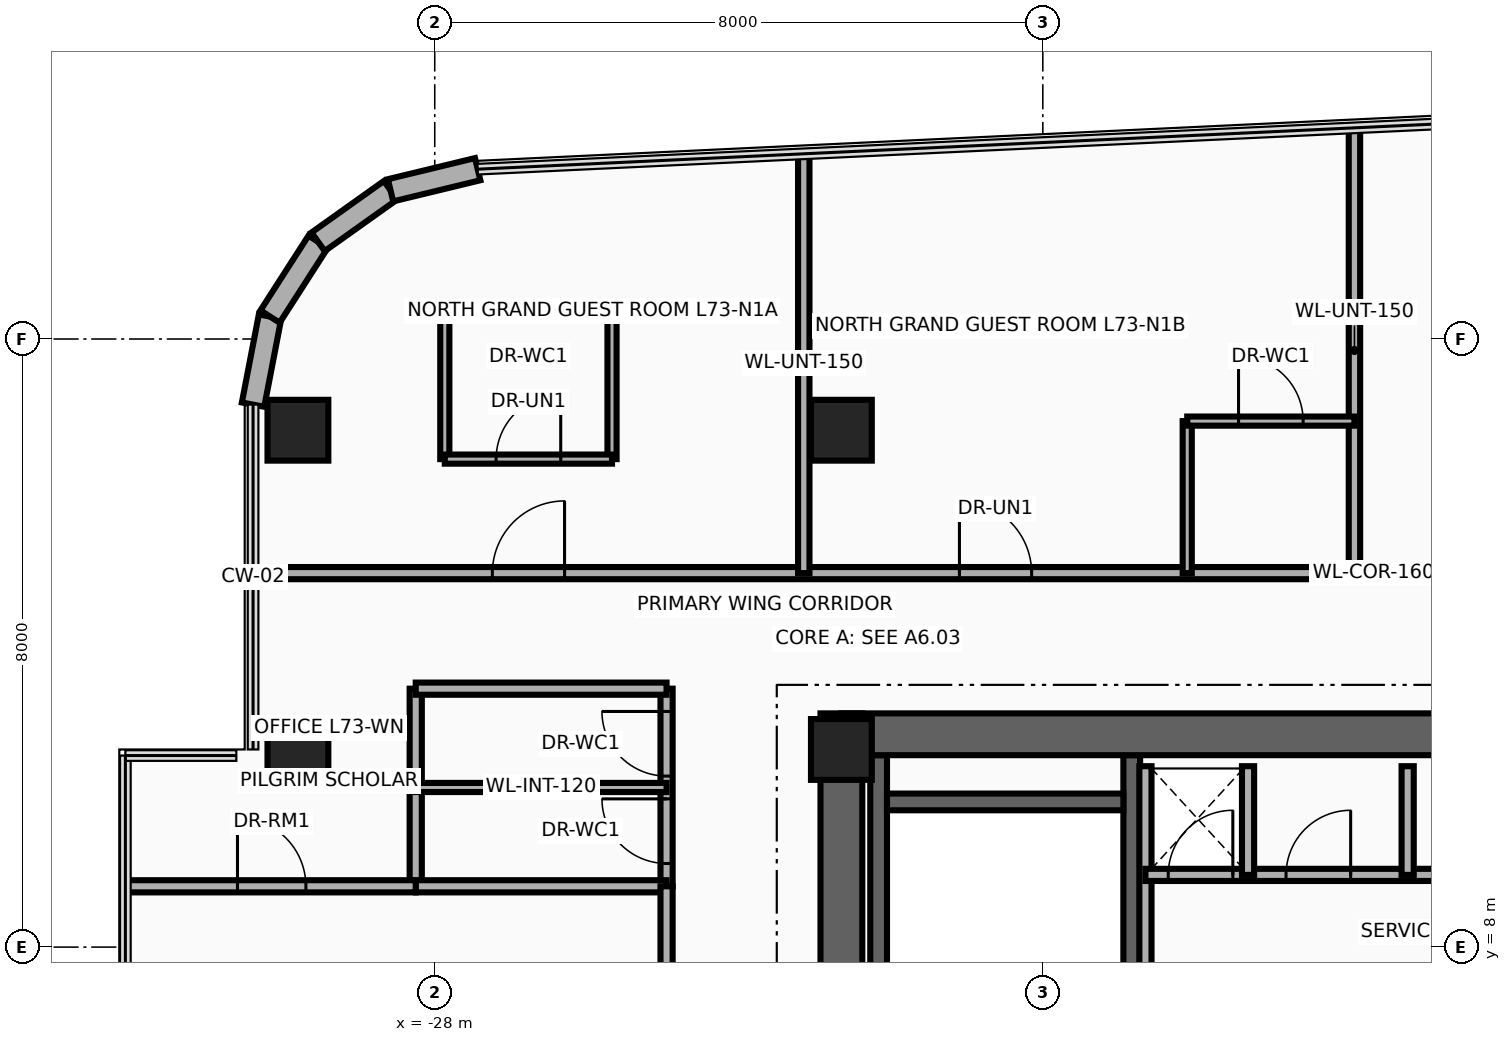
"""IFC4 building model, lengths in metres.
Left out: names, types, materials, properties, quantities, classifications, styles, units other than length and angle.
Written with IfcOpenShell. Run it as: python <this file> out.ifc"""

import sys

from ifc_helpers import new_model, si_unit, direction, frame, frame_2d, origin, origin_2d, place, context, subcontext, project, spatial, rectangle, extrude, source, transform, mapped, element, fill, save


model = new_model("IFC4")
c1 = context("Model", 3, precision=1e-05, world=origin(), true_north=direction((0.0, 1.0)))
c2 = subcontext(c1, "Body", "Model", "MODEL_VIEW")
j1 = project(units=[si_unit("LENGTHUNIT", "METRE"), si_unit("PLANEANGLEUNIT", "RADIAN")], contexts=[c1])
p1 = place(None, origin())
s1 = spatial("IfcSite", under=j1, at=p1, CompositionType="ELEMENT")
p2 = place(p1, origin())
s2 = spatial("IfcBuilding", under=s1, at=p2, CompositionType="ELEMENT")
p3 = place(p2, frame((0.0, 0.0, 280.0)))
s3 = spatial("IfcBuildingStorey", under=s2, at=p3, CompositionType="ELEMENT", Elevation=280.0)
for number, where, z_axis, x_axis in (
    (1, (-22.16, 1.78, 0.0), (0.0, 0.0, 1.0), (0.0, 1.0, 0.0)),
    (2, (-18.83, 1.78, 0.0), (0.0, 0.0, 1.0), (0.0, 1.0, 0.0)),
):
    element("IfcWall", number, at=place(p3, frame(where, z_axis=z_axis, x_axis=x_axis)), inside=s3, PredefinedType="SHEAR", context=c2, shape_type="SweptSolid", body=[
        extrude(rectangle(XDim=8.745, YDim=0.22, at=frame_2d((4.373, 0.0))), origin(), (0.0, 0.0, 1.0), 3.26),
    ])
p4 = place(p3, frame((-22.05, 9.91, 0.0), z_axis=(0.0, 0.0, 1.0), x_axis=(1.0, 0.0, 0.0)))
e3 = element("IfcWall", 3, at=p4, inside=s3, PredefinedType="SHEAR", context=c2, shape_type="SweptSolid", body=[
    extrude(rectangle(XDim=3.11, YDim=0.22, at=frame_2d((1.555, 0.0))), origin(), (0.0, 0.0, 1.0), 3.26),
])
p5 = place(p3, frame((-22.65, -11.075, 0.0), z_axis=(0.0, 0.0, 1.0), x_axis=(0.0, 1.0, 0.0)))
e4 = element("IfcWall", 4, at=p5, inside=s3, PredefinedType="SHEAR", context=c2, shape_type="SweptSolid", body=[
    extrude(rectangle(XDim=22.15, YDim=0.55, at=frame_2d((11.075, 0.0))), origin(), (0.0, 0.0, 1.0), 3.26),
])
p6 = place(p3, frame((-22.65, 10.8, 0.0), z_axis=(0.0, 0.0, 1.0), x_axis=(1.0, 0.0, 0.0)))
e5 = element("IfcWall", 5, at=p6, inside=s3, PredefinedType="SHEAR", context=c2, shape_type="SweptSolid", body=[
    extrude(rectangle(XDim=10.25, YDim=0.55, at=frame_2d((5.125, 0.0))), origin(), (0.0, 0.0, 1.0), 3.26),
])
m1 = source(origin(), c2, "Body", "SweptSolid", [
    extrude(rectangle(XDim=0.8, YDim=0.8, at=origin_2d()), origin(), (0.0, 0.0, 1.0), 3.5),
])
for number, where, z_axis, x_axis in (
    (6, (-29.8, 10.6, 0.0), (0.0, 0.0, 1.0), (1.0, 0.0, 0.0)),
    (7, (-22.65, 10.6, 0.0), (0.0, 0.0, 1.0), (1.0, 0.0, 0.0)),
    (8, (-29.8, 14.8, 0.0), (0.0, 0.0, 1.0), (1.0, 0.0, 0.0)),
    (9, (-22.65, 14.8, 0.0), (0.0, 0.0, 1.0), (1.0, 0.0, 0.0)),
):
    element("IfcColumn", number, at=place(p3, frame(where, z_axis=z_axis, x_axis=x_axis)), inside=s3, PredefinedType="COLUMN", context=c2, shape_type="MappedRepresentation", body=[
        mapped(m1, transform((0.0, 0.0, 0.0), x_axis=(1.0, 0.0, 0.0), y_axis=(0.0, 1.0, 0.0), z_axis=(0.0, 0.0, 1.0), scale=1.0)),
    ])
p7 = place(p3, frame((-30.39, 15.137, 0.0), z_axis=(0.0, 0.0, 1.0), x_axis=(0.189307792679, 0.981917796779, 0.0)))
e10 = element("IfcWall", 10, at=p7, inside=s3, PredefinedType="SOLIDWALL", context=c2, shape_type="SweptSolid", body=[
    extrude(rectangle(XDim=1.18, YDim=0.3, at=frame_2d((0.59, 0.0))), origin(), (0.0, 0.0, 1.0), 2.245),
])
p8 = place(p3, frame((-30.167, 16.295, 0.0), z_axis=(0.0, 0.0, 1.0), x_axis=(0.540842020947, 0.841124193195, 0.0)))
e11 = element("IfcWall", 11, at=p8, inside=s3, PredefinedType="SOLIDWALL", context=c2, shape_type="SweptSolid", body=[
    extrude(rectangle(XDim=1.169, YDim=0.3, at=frame_2d((0.584, 0.0))), origin(), (0.0, 0.0, 1.0), 3.26),
])
p9 = place(p3, frame((-29.534, 17.279, 0.0), z_axis=(0.0, 0.0, 1.0), x_axis=(0.81466371606, 0.579933642527, 0.0)))
e12 = element("IfcWall", 12, at=p9, inside=s3, PredefinedType="SOLIDWALL", context=c2, shape_type="SweptSolid", body=[
    extrude(rectangle(XDim=1.169, YDim=0.3, at=frame_2d((0.584, 0.0))), origin(), (0.0, 0.0, 1.0), 3.26),
])
p10 = place(p3, frame((-28.582, 17.957, 0.0), z_axis=(0.0, 0.0, 1.0), x_axis=(0.971929016595, 0.235274279725, 0.0)))
e13 = element("IfcWall", 13, at=p10, inside=s3, PredefinedType="SOLIDWALL", context=c2, shape_type="SweptSolid", body=[
    extrude(rectangle(XDim=1.18, YDim=0.3, at=frame_2d((0.59, 0.0))), origin(), (0.0, 0.0, 1.0), 3.26),
])
p11 = place(p3, frame((-18.65, 7.45, 0.0), z_axis=(0.0, 0.0, 1.0), x_axis=(0.0, 1.0, 0.0)))
e14 = element("IfcWall", 14, at=p11, inside=s3, PredefinedType="PARTITIONING", context=c2, shape_type="SweptSolid", body=[
    extrude(rectangle(XDim=2.93, YDim=0.16, at=frame_2d((1.465, 0.0))), origin(), (0.0, 0.0, 1.0), 3.26),
])
p12 = place(p3, frame((-18.65, 8.95, 0.0), z_axis=(0.0, 0.0, 1.0), x_axis=(1.0, 0.0, 0.0)))
e15 = element("IfcWall", 15, at=p12, inside=s3, PredefinedType="PARTITIONING", context=c2, shape_type="SweptSolid", body=[
    extrude(rectangle(XDim=5.5, YDim=0.16, at=frame_2d((2.75, 0.0))), origin(), (0.0, 0.0, 1.0), 3.26),
])
p13 = place(p12, frame((0.3, 0.0, 0.0)))
e16 = element("IfcOpeningElement", 16, at=p13, cuts=e15, PredefinedType="OPENING", context=c2, shape_type="SweptSolid", body=[
    extrude(rectangle(XDim=0.85, YDim=2.05, at=frame_2d((0.425, 1.025))), frame((0.0, 0.095, 0.0), z_axis=(0.0, -1.0, 0.0), x_axis=(1.0, 0.0, 0.0)), (0.0, 0.0, 1.0), 0.19),
])
p14 = place(p12, frame((1.85, 0.0, 0.0)))
e17 = element("IfcOpeningElement", 17, at=p14, cuts=e15, PredefinedType="OPENING", context=c2, shape_type="SweptSolid", body=[
    extrude(rectangle(XDim=0.85, YDim=2.05, at=frame_2d((0.425, 1.025))), frame((0.0, 0.095, 0.0), z_axis=(0.0, -1.0, 0.0), x_axis=(1.0, 0.0, 0.0)), (0.0, 0.0, 1.0), 0.19),
])
p15 = place(p12, frame((3.9, 0.0, 0.0)))
e18 = element("IfcOpeningElement", 18, at=p15, cuts=e15, PredefinedType="OPENING", context=c2, shape_type="SweptSolid", body=[
    extrude(rectangle(XDim=0.85, YDim=2.05, at=frame_2d((0.425, 1.025))), frame((0.0, 0.095, 0.0), z_axis=(0.0, -1.0, 0.0), x_axis=(1.0, 0.0, 0.0)), (0.0, 0.0, 1.0), 0.19),
])
for number, where, z_axis, x_axis in (
    (19, (-17.3, 8.95, 0.0), (0.0, 0.0, 1.0), (0.0, 1.0, 0.0)),
    (20, (-15.2, 8.95, 0.0), (0.0, 0.0, 1.0), (0.0, 1.0, 0.0)),
):
    element("IfcWall", number, at=place(p3, frame(where, z_axis=z_axis, x_axis=x_axis)), inside=s3, PredefinedType="PARTITIONING", context=c2, shape_type="SweptSolid", body=[
        extrude(rectangle(XDim=1.43, YDim=0.16, at=frame_2d((0.715, 0.0))), origin(), (0.0, 0.0, 1.0), 3.26),
    ])
p16 = place(p3, frame((-28.25, 8.8, 0.0), z_axis=(0.0, 0.0, 1.0), x_axis=(0.0, 1.0, 0.0)))
e21 = element("IfcWall", 21, at=p16, inside=s3, PredefinedType="PARTITIONING", context=c2, shape_type="SweptSolid", body=[
    extrude(rectangle(XDim=2.6, YDim=0.16, at=frame_2d((1.3, 0.0))), origin(), (0.0, 0.0, 1.0), 2.623),
])
p17 = place(p3, frame((-24.95, 8.8, 0.0), z_axis=(0.0, 0.0, 1.0), x_axis=(0.0, 1.0, 0.0)))
e22 = element("IfcWall", 22, at=p17, inside=s3, PredefinedType="PARTITIONING", context=c2, shape_type="SweptSolid", body=[
    extrude(rectangle(XDim=2.6, YDim=0.16, at=frame_2d((1.3, 0.0))), origin(), (0.0, 0.0, 1.0), 2.623),
])
p18 = place(p17, frame((0.3, 0.0, 0.0)))
e23 = element("IfcOpeningElement", 23, at=p18, cuts=e22, PredefinedType="OPENING", context=c2, shape_type="SweptSolid", body=[
    extrude(rectangle(XDim=0.85, YDim=2.1, at=frame_2d((0.425, 1.05))), frame((0.0, 0.095, 0.0), z_axis=(0.0, -1.0, 0.0), x_axis=(1.0, 0.0, 0.0)), (0.0, 0.0, 1.0), 0.19),
])
p19 = place(p17, frame((1.45, 0.0, 0.0)))
e24 = element("IfcOpeningElement", 24, at=p19, cuts=e22, PredefinedType="OPENING", context=c2, shape_type="SweptSolid", body=[
    extrude(rectangle(XDim=0.85, YDim=2.1, at=frame_2d((0.425, 1.05))), frame((0.0, 0.095, 0.0), z_axis=(0.0, -1.0, 0.0), x_axis=(1.0, 0.0, 0.0)), (0.0, 0.0, 1.0), 0.19),
])
for number, where, z_axis, x_axis in (
    (25, (-28.25, 8.8, 0.0), (0.0, 0.0, 1.0), (1.0, 0.0, 0.0)),
    (26, (-28.25, 11.4, 0.0), (0.0, 0.0, 1.0), (1.0, 0.0, 0.0)),
):
    element("IfcWall", number, at=place(p3, frame(where, z_axis=z_axis, x_axis=x_axis)), inside=s3, PredefinedType="PARTITIONING", context=c2, shape_type="SweptSolid", body=[
        extrude(rectangle(XDim=3.3, YDim=0.16, at=frame_2d((1.65, 0.0))), origin(), (0.0, 0.0, 1.0), 3.26),
    ])
p20 = place(p3, frame((-28.25, 10.1, 0.0), z_axis=(0.0, 0.0, 1.0), x_axis=(1.0, 0.0, 0.0)))
e27 = element("IfcWall", 27, at=p20, inside=s3, PredefinedType="PARTITIONING", context=c2, shape_type="SweptSolid", body=[
    extrude(rectangle(XDim=3.3, YDim=0.12, at=frame_2d((1.65, 0.0))), origin(), (0.0, 0.0, 1.0), 3.26),
])
p21 = place(p3, frame((-24.95, -16.24, 0.0), z_axis=(0.0, 0.0, 1.0), x_axis=(0.0, 1.0, 0.0)))
e28 = element("IfcWall", 28, at=p21, inside=s3, PredefinedType="PARTITIONING", context=c2, shape_type="SweptSolid", body=[
    extrude(rectangle(XDim=25.04, YDim=0.16, at=frame_2d((12.52, 0.0))), origin(), (0.0, 0.0, 1.0), 2.623),
])
p22 = place(p21, frame((2.442, 0.0, 0.0)))
e29 = element("IfcOpeningElement", 29, at=p22, cuts=e28, PredefinedType="OPENING", context=c2, shape_type="SweptSolid", body=[
    extrude(rectangle(XDim=0.9, YDim=2.1, at=frame_2d((0.45, 1.05))), frame((0.0, 0.095, 0.0), z_axis=(0.0, -1.0, 0.0), x_axis=(1.0, 0.0, 0.0)), (0.0, 0.0, 1.0), 0.19),
])
p23 = place(p21, frame((8.227, 0.0, 0.0)))
e30 = element("IfcOpeningElement", 30, at=p23, cuts=e28, PredefinedType="OPENING", context=c2, shape_type="SweptSolid", body=[
    extrude(rectangle(XDim=0.9, YDim=2.1, at=frame_2d((0.45, 1.05))), frame((0.0, 0.095, 0.0), z_axis=(0.0, -1.0, 0.0), x_axis=(1.0, 0.0, 0.0)), (0.0, 0.0, 1.0), 0.19),
])
p24 = place(p21, frame((13.463, 0.0, 0.0)))
e31 = element("IfcOpeningElement", 31, at=p24, cuts=e28, PredefinedType="OPENING", context=c2, shape_type="SweptSolid", body=[
    extrude(rectangle(XDim=0.95, YDim=2.15, at=frame_2d((0.475, 1.075))), frame((0.0, 0.095, 0.0), z_axis=(0.0, -1.0, 0.0), x_axis=(1.0, 0.0, 0.0)), (0.0, 0.0, 1.0), 0.19),
])
p25 = place(p21, frame((22.197, 0.0, 0.0)))
e32 = element("IfcOpeningElement", 32, at=p25, cuts=e28, PredefinedType="OPENING", context=c2, shape_type="SweptSolid", body=[
    extrude(rectangle(XDim=0.95, YDim=2.15, at=frame_2d((0.475, 1.075))), frame((0.0, 0.095, 0.0), z_axis=(0.0, -1.0, 0.0), x_axis=(1.0, 0.0, 0.0)), (0.0, 0.0, 1.0), 0.19),
])
p26 = place(p3, frame((-32.04, 8.8, 0.0), z_axis=(0.0, 0.0, 1.0), x_axis=(1.0, 0.0, 0.0)))
e33 = element("IfcWall", 33, at=p26, inside=s3, PredefinedType="PARTITIONING", context=c2, shape_type="SweptSolid", body=[
    extrude(rectangle(XDim=3.79, YDim=0.16, at=frame_2d((1.895, 0.0))), origin(), (0.0, 0.0, 1.0), 2.706),
])
p27 = place(p26, frame((1.445, 0.0, 0.0)))
e34 = element("IfcOpeningElement", 34, at=p27, cuts=e33, PredefinedType="OPENING", context=c2, shape_type="SweptSolid", body=[
    extrude(rectangle(XDim=0.9, YDim=2.1, at=frame_2d((0.45, 1.05))), frame((0.0, 0.095, 0.0), z_axis=(0.0, -1.0, 0.0), x_axis=(1.0, 0.0, 0.0)), (0.0, 0.0, 1.0), 0.19),
])
p28 = place(p3, frame((-30.39, 12.92, 0.0), z_axis=(0.0, 0.0, 1.0), x_axis=(1.0, 0.0, 0.0)))
e35 = element("IfcWall", 35, at=p28, inside=s3, PredefinedType="PARTITIONING", context=c2, shape_type="SweptSolid", body=[
    extrude(rectangle(XDim=29.48, YDim=0.16, at=frame_2d((14.74, 0.0))), origin(), (0.0, 0.0, 1.0), 2.634),
])
p29 = place(p28, frame((3.148, 0.0, 0.0)))
e36 = element("IfcOpeningElement", 36, at=p29, cuts=e35, PredefinedType="OPENING", context=c2, shape_type="SweptSolid", body=[
    extrude(rectangle(XDim=0.95, YDim=2.15, at=frame_2d((0.475, 1.075))), frame((0.0, 0.095, 0.0), z_axis=(0.0, -1.0, 0.0), x_axis=(1.0, 0.0, 0.0)), (0.0, 0.0, 1.0), 0.19),
])
p30 = place(p28, frame((9.293, 0.0, 0.0)))
e37 = element("IfcOpeningElement", 37, at=p30, cuts=e35, PredefinedType="OPENING", context=c2, shape_type="SweptSolid", body=[
    extrude(rectangle(XDim=0.95, YDim=2.15, at=frame_2d((0.475, 1.075))), frame((0.0, 0.095, 0.0), z_axis=(0.0, -1.0, 0.0), x_axis=(1.0, 0.0, 0.0)), (0.0, 0.0, 1.0), 0.19),
])
p31 = place(p28, frame((21.085, 0.0, 0.0)))
e38 = element("IfcOpeningElement", 38, at=p31, cuts=e35, PredefinedType="OPENING", context=c2, shape_type="SweptSolid", body=[
    extrude(rectangle(XDim=1.8, YDim=2.15, at=frame_2d((0.9, 1.075))), frame((0.0, 0.095, 0.0), z_axis=(0.0, -1.0, 0.0), x_axis=(1.0, 0.0, 0.0)), (0.0, 0.0, 1.0), 0.19),
])
p32 = place(p3, frame((-15.9, 12.92, 0.0), z_axis=(0.0, 0.0, 1.0), x_axis=(0.0, 1.0, 0.0)))
e39 = element("IfcWall", 39, at=p32, inside=s3, PredefinedType="PARTITIONING", context=c2, shape_type="SweptSolid", body=[
    extrude(rectangle(XDim=5.858, YDim=0.15, at=frame_2d((2.929, 0.0))), origin(), (0.0, 0.0, 1.0), 2.623),
])
p33 = place(p3, frame((-23.145, 12.92, 0.0), z_axis=(0.0, 0.0, 1.0), x_axis=(0.0, 1.0, 0.0)))
e40 = element("IfcWall", 40, at=p33, inside=s3, PredefinedType="PARTITIONING", context=c2, shape_type="SweptSolid", body=[
    extrude(rectangle(XDim=5.517, YDim=0.15, at=frame_2d((2.758, 0.0))), origin(), (0.0, 0.0, 1.0), 2.623),
])
for number, where, z_axis, x_axis in (
    (41, (-27.867, 14.42, 0.0), (0.0, 0.0, 1.0), (0.0, 1.0, 0.0)),
    (42, (-25.667, 14.42, 0.0), (0.0, 0.0, 1.0), (0.0, 1.0, 0.0)),
):
    element("IfcWall", number, at=place(p3, frame(where, z_axis=z_axis, x_axis=x_axis)), inside=s3, PredefinedType="PARTITIONING", context=c2, shape_type="SweptSolid", body=[
        extrude(rectangle(XDim=1.986, YDim=0.12, at=frame_2d((0.993, 0.0))), origin(), (0.0, 0.0, 1.0), 2.623),
    ])
p34 = place(p3, frame((-27.867, 16.406, 0.0), z_axis=(0.0, 0.0, 1.0), x_axis=(1.0, 0.0, 0.0)))
e43 = element("IfcWall", 43, at=p34, inside=s3, PredefinedType="PARTITIONING", context=c2, shape_type="SweptSolid", body=[
    extrude(rectangle(XDim=2.2, YDim=0.12, at=frame_2d((1.1, 0.0))), origin(), (0.0, 0.0, 1.0), 3.26),
])
p35 = place(p3, frame((-27.867, 14.42, 0.0), z_axis=(0.0, 0.0, 1.0), x_axis=(1.0, 0.0, 0.0)))
e44 = element("IfcWall", 44, at=p35, inside=s3, PredefinedType="PARTITIONING", context=c2, shape_type="SweptSolid", body=[
    extrude(rectangle(XDim=2.2, YDim=0.12, at=frame_2d((1.1, 0.0))), origin(), (0.0, 0.0, 1.0), 3.26),
])
p36 = place(p35, frame((0.675, 0.0, 0.0)))
e45 = element("IfcOpeningElement", 45, at=p36, cuts=e44, PredefinedType="OPENING", context=c2, shape_type="SweptSolid", body=[
    extrude(rectangle(XDim=0.85, YDim=2.1, at=frame_2d((0.425, 1.05))), frame((0.0, 0.075, 0.0), z_axis=(0.0, -1.0, 0.0), x_axis=(1.0, 0.0, 0.0)), (0.0, 0.0, 1.0), 0.15),
])
p37 = place(p3, frame((-18.1, 12.92, 0.0), z_axis=(0.0, 0.0, 1.0), x_axis=(0.0, 1.0, 0.0)))
e46 = element("IfcWall", 46, at=p37, inside=s3, PredefinedType="PARTITIONING", context=c2, shape_type="SweptSolid", body=[
    extrude(rectangle(XDim=2.0, YDim=0.12, at=frame_2d((1.0, 0.0))), origin(), (0.0, 0.0, 1.0), 2.623),
])
p38 = place(p3, frame((-18.1, 14.92, 0.0), z_axis=(0.0, 0.0, 1.0), x_axis=(1.0, 0.0, 0.0)))
e47 = element("IfcWall", 47, at=p38, inside=s3, PredefinedType="PARTITIONING", context=c2, shape_type="SweptSolid", body=[
    extrude(rectangle(XDim=2.2, YDim=0.12, at=frame_2d((1.1, 0.0))), origin(), (0.0, 0.0, 1.0), 2.623),
])
p39 = place(p38, frame((0.675, 0.0, 0.0)))
e48 = element("IfcOpeningElement", 48, at=p39, cuts=e47, PredefinedType="OPENING", context=c2, shape_type="SweptSolid", body=[
    extrude(rectangle(XDim=0.85, YDim=2.1, at=frame_2d((0.425, 1.05))), frame((0.0, 0.075, 0.0), z_axis=(0.0, -1.0, 0.0), x_axis=(1.0, 0.0, 0.0)), (0.0, 0.0, 1.0), 0.15),
])
p40 = place(p13, origin())
e49 = element("IfcDoor", 49, at=p40, inside=s3, OperationType="SINGLE_SWING_LEFT", PredefinedType="DOOR", context=c2, shape_type="SweptSolid", body=[
    extrude(rectangle(XDim=0.85, YDim=2.05, at=frame_2d((0.425, 1.025))), frame((0.0, 0.025, 0.0), z_axis=(0.0, -1.0, 0.0), x_axis=(1.0, 0.0, 0.0)), (0.0, 0.0, 1.0), 0.05),
])
fill(e16, e49)
p41 = place(p14, origin())
e50 = element("IfcDoor", 50, at=p41, inside=s3, OperationType="SINGLE_SWING_RIGHT", PredefinedType="DOOR", context=c2, shape_type="SweptSolid", body=[
    extrude(rectangle(XDim=0.85, YDim=2.05, at=frame_2d((0.425, 1.025))), frame((0.0, 0.025, 0.0), z_axis=(0.0, -1.0, 0.0), x_axis=(1.0, 0.0, 0.0)), (0.0, 0.0, 1.0), 0.05),
])
fill(e17, e50)
p42 = place(p18, origin())
e51 = element("IfcDoor", 51, at=p42, inside=s3, OperationType="SINGLE_SWING_RIGHT", PredefinedType="DOOR", context=c2, shape_type="SweptSolid", body=[
    extrude(rectangle(XDim=0.85, YDim=2.1, at=frame_2d((0.425, 1.05))), frame((0.0, 0.025, 0.0), z_axis=(0.0, -1.0, 0.0), x_axis=(1.0, 0.0, 0.0)), (0.0, 0.0, 1.0), 0.05),
])
fill(e23, e51)
p43 = place(p19, origin())
e52 = element("IfcDoor", 52, at=p43, inside=s3, OperationType="SINGLE_SWING_LEFT", PredefinedType="DOOR", context=c2, shape_type="SweptSolid", body=[
    extrude(rectangle(XDim=0.85, YDim=2.1, at=frame_2d((0.425, 1.05))), frame((0.0, 0.025, 0.0), z_axis=(0.0, -1.0, 0.0), x_axis=(1.0, 0.0, 0.0)), (0.0, 0.0, 1.0), 0.05),
])
fill(e24, e52)
p44 = place(p27, origin())
e53 = element("IfcDoor", 53, at=p44, inside=s3, OperationType="SINGLE_SWING_RIGHT", PredefinedType="DOOR", context=c2, shape_type="SweptSolid", body=[
    extrude(rectangle(XDim=0.9, YDim=2.1, at=frame_2d((0.45, 1.05))), frame((0.0, 0.025, 0.0), z_axis=(0.0, -1.0, 0.0), x_axis=(1.0, 0.0, 0.0)), (0.0, 0.0, 1.0), 0.05),
])
fill(e34, e53)
p45 = place(p29, origin())
e54 = element("IfcDoor", 54, at=p45, inside=s3, OperationType="SINGLE_SWING_RIGHT", PredefinedType="DOOR", context=c2, shape_type="SweptSolid", body=[
    extrude(rectangle(XDim=0.95, YDim=2.15, at=frame_2d((0.475, 1.075))), frame((0.0, 0.025, 0.0), z_axis=(0.0, -1.0, 0.0), x_axis=(1.0, 0.0, 0.0)), (0.0, 0.0, 1.0), 0.05),
])
fill(e36, e54)
p46 = place(p36, origin())
e55 = element("IfcDoor", 55, at=p46, inside=s3, OperationType="SINGLE_SWING_LEFT", PredefinedType="DOOR", context=c2, shape_type="SweptSolid", body=[
    extrude(rectangle(XDim=0.85, YDim=2.1, at=frame_2d((0.425, 1.05))), frame((0.0, 0.025, 0.0), z_axis=(0.0, -1.0, 0.0), x_axis=(1.0, 0.0, 0.0)), (0.0, 0.0, 1.0), 0.05),
])
fill(e45, e55)
p47 = place(p30, origin())
e56 = element("IfcDoor", 56, at=p47, inside=s3, OperationType="SINGLE_SWING_RIGHT", PredefinedType="DOOR", context=c2, shape_type="SweptSolid", body=[
    extrude(rectangle(XDim=0.95, YDim=2.15, at=frame_2d((0.475, 1.075))), frame((0.0, 0.025, 0.0), z_axis=(0.0, -1.0, 0.0), x_axis=(1.0, 0.0, 0.0)), (0.0, 0.0, 1.0), 0.05),
])
fill(e37, e56)
p48 = place(p39, origin())
e57 = element("IfcDoor", 57, at=p48, inside=s3, OperationType="SINGLE_SWING_LEFT", PredefinedType="DOOR", context=c2, shape_type="SweptSolid", body=[
    extrude(rectangle(XDim=0.85, YDim=2.1, at=frame_2d((0.425, 1.05))), frame((0.0, 0.025, 0.0), z_axis=(0.0, -1.0, 0.0), x_axis=(1.0, 0.0, 0.0)), (0.0, 0.0, 1.0), 0.05),
])
fill(e48, e57)
save(model, sys.argv[1])
